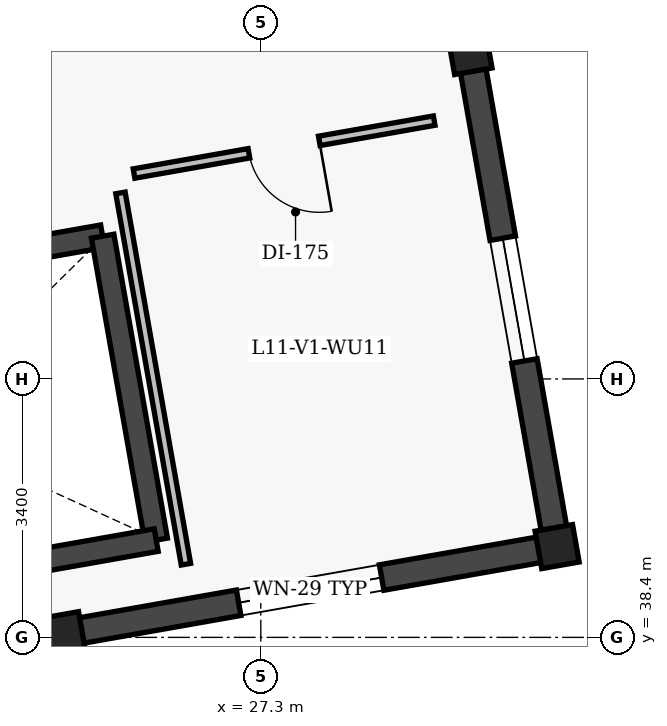
"""IFC4 building model, lengths in metres.
Left out: names, types, materials, properties, quantities, classifications, styles, units other than length and angle.
Written with IfcOpenShell. Run it as: python <this file> out.ifc"""

import sys

from ifc_helpers import new_model, si_unit, direction, frame, frame_2d, origin, origin_2d, place, context, subcontext, project, spatial, polyline, rectangle, outline, extrude, element, fill, save


model = new_model("IFC4")
c1 = context("Model", 3, precision=1e-05, world=origin(), true_north=direction((0.0, 1.0)))
c2 = subcontext(c1, "Body", "Model", "MODEL_VIEW")
j1 = project(units=[si_unit("LENGTHUNIT", "METRE"), si_unit("PLANEANGLEUNIT", "RADIAN")], contexts=[c1])
p1 = place(None, origin())
s1 = spatial("IfcSite", under=j1, at=p1, CompositionType="ELEMENT")
p2 = place(p1, origin())
s2 = spatial("IfcBuilding", under=s1, at=p2, CompositionType="ELEMENT")
p3 = place(p2, frame((0.0, 0.0, 49.2)))
s3 = spatial("IfcBuildingStorey", under=s2, at=p3, CompositionType="ELEMENT", Elevation=49.2)
for number, where, z_axis, x_axis in (
    (1, (24.699, 38.448, 0.0), (0.0, 0.0, 1.0), (0.985, 0.174, 0.0)),
    (2, (31.199, 39.594, 0.0), (0.0, 0.0, 1.0), (0.985, 0.174, 0.0)),
):
    element("IfcColumn", number, at=place(p3, frame(where, z_axis=z_axis, x_axis=x_axis)), inside=s3, PredefinedType="COLUMN", context=c2, shape_type="SweptSolid", body=[
        extrude(rectangle(XDim=0.5, YDim=0.5, at=origin_2d()), origin(), (0.0, 0.0, 1.0), 3.985),
    ])
p4 = place(p3, frame((30.053, 46.094, 0.0), z_axis=(0.0, 0.0, 1.0), x_axis=(0.984807753012, 0.173648177667, 0.0)))
e3 = element("IfcColumn", 3, at=p4, inside=s3, PredefinedType="COLUMN", context=c2, shape_type="SweptSolid", body=[
    extrude(rectangle(XDim=0.5, YDim=0.5, at=origin_2d()), origin(), (0.0, 0.0, 1.0), 4.2),
])
p5 = place(p3, frame((30.095, 45.853, 0.0), z_axis=(0.0, 0.0, 1.0), x_axis=(0.173657681232, -0.98480607723, 0.0)))
e4 = element("IfcWall", 4, at=p5, inside=s3, PredefinedType="SOLIDWALL", context=c2, shape_type="SweptSolid", body=[
    extrude(outline(polyline([(0.0, 0.0), (6.11, 0.0), (6.11, 4.0), (0.0, 5.234), (0.0, 0.0)])), frame((0.0, 0.17, 0.0), z_axis=(0.0, -1.0, 0.0), x_axis=(1.0, 0.0, 0.0)), (0.0, 0.0, 1.0), 0.34),
])
p6 = place(p5, frame((2.235, 0.0, 0.95)))
e5 = element("IfcOpeningElement", 5, at=p6, cuts=e4, PredefinedType="OPENING", context=c2, shape_type="SweptSolid", body=[
    extrude(rectangle(XDim=1.64, YDim=1.48, at=frame_2d((0.82, 0.74))), frame((0.0, 0.17, 0.0), z_axis=(0.0, -1.0, 0.0), x_axis=(1.0, 0.0, 0.0)), (0.0, 0.0, 1.0), 0.34),
])
p7 = place(p3, frame((30.958, 39.552, 0.0), z_axis=(0.0, 0.0, 1.0), x_axis=(-0.984807282173, -0.173650847905, 0.0)))
e6 = element("IfcWall", 6, at=p7, inside=s3, PredefinedType="SOLIDWALL", context=c2, shape_type="SweptSolid", body=[
    extrude(rectangle(XDim=6.11, YDim=0.34, at=frame_2d((3.055, 0.0))), origin(), (0.0, 0.0, 1.0), 3.47),
])
p8 = place(p7, frame((2.1, 0.0, 0.95)))
e7 = element("IfcOpeningElement", 7, at=p8, cuts=e6, PredefinedType="OPENING", context=c2, shape_type="SweptSolid", body=[
    extrude(rectangle(XDim=1.91, YDim=1.4, at=frame_2d((0.955, 0.7))), frame((0.0, 0.17, 0.0), z_axis=(0.0, -1.0, 0.0), x_axis=(1.0, 0.0, 0.0)), (0.0, 0.0, 1.0), 0.34),
])
p9 = place(p3, frame((17.863, 42.381, 0.0), z_axis=(0.0, 0.0, 1.0), x_axis=(0.984808225754, 0.173645496596, 0.0)))
e8 = element("IfcWall", 8, at=p9, inside=s3, PredefinedType="SHEAR", context=c2, shape_type="SweptSolid", body=[
    extrude(rectangle(XDim=7.47, YDim=0.3, at=frame_2d((3.735, 0.0))), origin(), (0.0, 0.0, 1.0), 3.98),
])
p10 = place(p9, frame((0.18, 0.0, 0.0)))
e9 = element("IfcOpeningElement", 9, at=p10, cuts=e8, PredefinedType="OPENING", context=c2, shape_type="SweptSolid", body=[
    extrude(rectangle(XDim=1.08, YDim=2.15, at=frame_2d((0.54, 1.075))), frame((0.0, 0.15, 0.0), z_axis=(0.0, -1.0, 0.0), x_axis=(1.0, 0.0, 0.0)), (0.0, 0.0, 1.0), 0.3),
])
p11 = place(p3, frame((25.219, 43.678, 0.0), z_axis=(0.0, 0.0, 1.0), x_axis=(0.173665267602, -0.984804739443, 0.0)))
e10 = element("IfcWall", 10, at=p11, inside=s3, PredefinedType="SHEAR", context=c2, shape_type="SweptSolid", body=[
    extrude(rectangle(XDim=4.06, YDim=0.3, at=frame_2d((2.03, 0.0))), origin(), (0.0, 0.0, 1.0), 3.98),
])
p12 = place(p3, frame((25.924, 39.68, 0.0), z_axis=(0.0, 0.0, 1.0), x_axis=(-0.984809211193, -0.173639907711, 0.0)))
e11 = element("IfcWall", 11, at=p12, inside=s3, PredefinedType="SHEAR", context=c2, shape_type="SweptSolid", body=[
    extrude(rectangle(XDim=7.47, YDim=0.3, at=frame_2d((3.735, 0.0))), origin(), (0.0, 0.0, 1.0), 3.98),
])
p13 = place(p3, frame((29.581, 45.198, 0.0), z_axis=(0.0, 0.0, 1.0), x_axis=(-0.984810514369, -0.173632516505, 0.0)))
e12 = element("IfcWall", 12, at=p13, inside=s3, PredefinedType="PARTITIONING", context=c2, shape_type="SweptSolid", body=[
    extrude(rectangle(XDim=4.01, YDim=0.125, at=frame_2d((2.005, 0.0))), origin(), (0.0, 0.0, 1.0), 3.65),
])
p14 = place(p13, frame((1.535, 0.0, 0.0)))
e13 = element("IfcOpeningElement", 13, at=p14, cuts=e12, PredefinedType="OPENING", context=c2, shape_type="SweptSolid", body=[
    extrude(rectangle(XDim=0.94, YDim=2.12, at=frame_2d((0.47, 1.06))), frame((0.0, 0.062, 0.0), z_axis=(0.0, -1.0, 0.0), x_axis=(1.0, 0.0, 0.0)), (0.0, 0.0, 1.0), 0.125),
])
p15 = place(p3, frame((25.454, 44.247, 0.0), z_axis=(0.0, 0.0, 1.0), x_axis=(0.173658971256, -0.98480584975, 0.0)))
e14 = element("IfcWall", 14, at=p15, inside=s3, PredefinedType="PARTITIONING", context=c2, shape_type="SweptSolid", body=[
    extrude(rectangle(XDim=4.96, YDim=0.125, at=frame_2d((2.48, 0.0))), origin(), (0.0, 0.0, 1.0), 3.65),
])
p16 = place(p6, origin())
e15 = element("IfcWindow", 15, at=p16, inside=s3, PartitioningType="SINGLE_PANEL", PredefinedType="WINDOW", context=c2, shape_type="SweptSolid", body=[
    extrude(rectangle(XDim=1.64, YDim=1.48, at=frame_2d((0.82, 0.74))), frame((0.0, 0.03, 0.0), z_axis=(0.0, -1.0, 0.0), x_axis=(1.0, 0.0, 0.0)), (0.0, 0.0, 1.0), 0.06),
])
fill(e5, e15)
p17 = place(p8, origin())
e16 = element("IfcWindow", 16, at=p17, inside=s3, PartitioningType="SINGLE_PANEL", PredefinedType="WINDOW", context=c2, shape_type="SweptSolid", body=[
    extrude(rectangle(XDim=1.91, YDim=1.4, at=frame_2d((0.955, 0.7))), frame((0.0, 0.03, 0.0), z_axis=(0.0, -1.0, 0.0), x_axis=(1.0, 0.0, 0.0)), (0.0, 0.0, 1.0), 0.06),
])
fill(e7, e16)
p18 = place(p14, origin())
e17 = element("IfcDoor", 17, at=p18, inside=s3, OperationType="SINGLE_SWING_LEFT", PredefinedType="DOOR", context=c2, shape_type="SweptSolid", body=[
    extrude(rectangle(XDim=0.94, YDim=2.12, at=frame_2d((0.47, 1.06))), frame((0.0, 0.025, 0.0), z_axis=(0.0, -1.0, 0.0), x_axis=(1.0, 0.0, 0.0)), (0.0, 0.0, 1.0), 0.05),
])
fill(e13, e17)
save(model, sys.argv[1])
